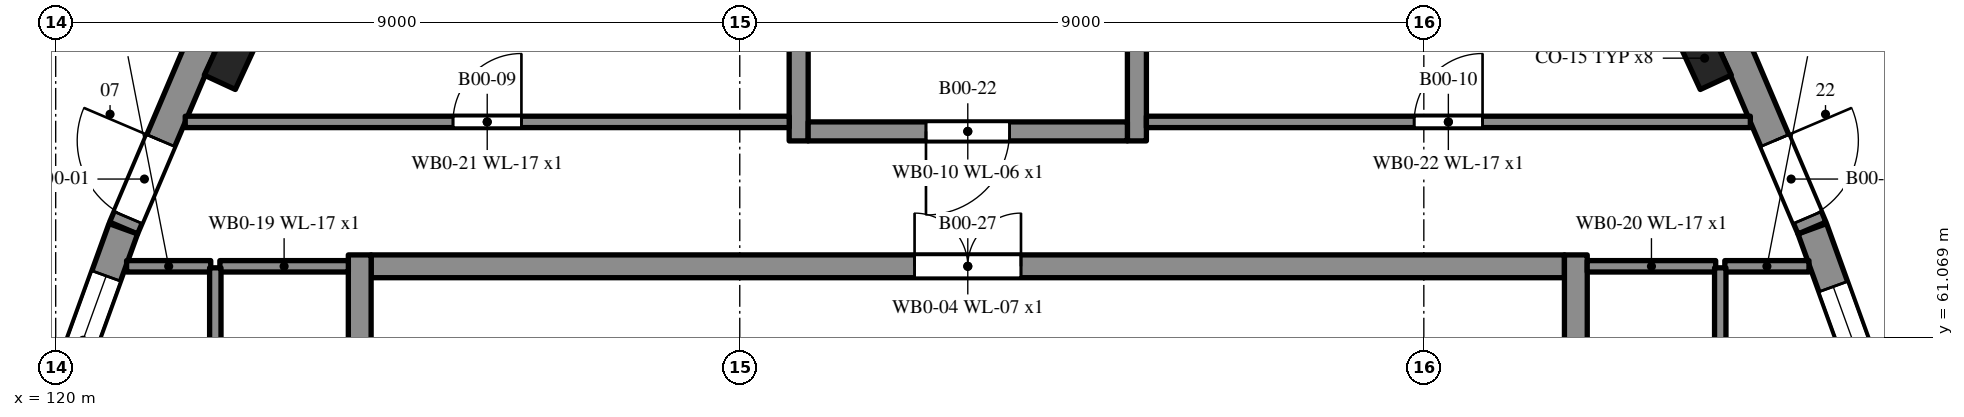
"""IFC4 building model, lengths in metres.
Left out: names, types, materials, properties, quantities, classifications, styles, units other than length and angle.
Written with IfcOpenShell. Run it as: python <this file> out.ifc"""

import sys

from ifc_helpers import new_model, si_unit, direction, frame, frame_2d, origin, origin_2d, place, context, subcontext, project, spatial, rectangle, extrude, element, fill, save


model = new_model("IFC4")
c1 = context("Model", 3, precision=1e-05, world=origin(), true_north=direction((0.0, 1.0)))
c2 = subcontext(c1, "Body", "Model", "MODEL_VIEW")
j1 = project(units=[si_unit("LENGTHUNIT", "METRE"), si_unit("PLANEANGLEUNIT", "RADIAN")], contexts=[c1])
p1 = place(None, origin())
s1 = spatial("IfcSite", under=j1, at=p1, CompositionType="ELEMENT")
p2 = place(p1, origin())
s2 = spatial("IfcBuilding", under=s1, at=p2, CompositionType="ELEMENT")
p3 = place(p2, origin())
s3 = spatial("IfcBuildingStorey", under=s2, at=p3, CompositionType="ELEMENT", Elevation=0.0)
p4 = place(p3, frame((144.001, 60.033, 0.0), z_axis=(0.0, 0.0, 1.0), x_axis=(-0.340394146267, 0.940282843184, 0.0)))
e1 = element("IfcWall", 1, at=p4, inside=s3, PredefinedType="SOLIDWALL", context=c2, shape_type="SweptSolid", body=[
    extrude(rectangle(XDim=2.616, YDim=0.4, at=frame_2d((1.308, 0.0))), origin(), (0.0, 0.0, 1.0), 5.1),
])
p5 = place(p4, frame((0.307, 0.0, 2.4)))
e2 = element("IfcOpeningElement", 2, at=p5, cuts=e1, PredefinedType="OPENING", context=c2, shape_type="SweptSolid", body=[
    extrude(rectangle(XDim=1.5, YDim=0.9, at=frame_2d((0.75, 0.45))), frame((0.0, 0.21, 0.0), z_axis=(0.0, -1.0, 0.0), x_axis=(1.0, 0.0, 0.0)), (0.0, 0.0, 1.0), 0.42),
])
p6 = place(p3, frame((143.107, 62.504, 0.0), z_axis=(0.0, 0.0, 1.0), x_axis=(-0.391529943778, 0.920165367271, 0.0)))
e3 = element("IfcWall", 3, at=p6, inside=s3, PredefinedType="SOLIDWALL", context=c2, shape_type="SweptSolid", body=[
    extrude(rectangle(XDim=2.616, YDim=0.4, at=frame_2d((1.308, 0.0))), origin(), (0.0, 0.0, 1.0), 5.1),
])
p7 = place(p6, frame((0.15, 0.0, 0.0)))
e4 = element("IfcOpeningElement", 4, at=p7, cuts=e3, PredefinedType="OPENING", context=c2, shape_type="SweptSolid", body=[
    extrude(rectangle(XDim=1.1, YDim=2.1, at=frame_2d((0.55, 1.05))), frame((0.0, 0.21, 0.0), z_axis=(0.0, -1.0, 0.0), x_axis=(1.0, 0.0, 0.0)), (0.0, 0.0, 1.0), 0.42),
])
p8 = place(p3, frame((121.917, 64.911, 0.0), z_axis=(0.0, 0.0, 1.0), x_axis=(-0.391529943778, -0.920165367271, 0.0)))
e5 = element("IfcWall", 5, at=p8, inside=s3, PredefinedType="SOLIDWALL", context=c2, shape_type="SweptSolid", body=[
    extrude(rectangle(XDim=2.616, YDim=0.4, at=frame_2d((1.308, 0.0))), origin(), (0.0, 0.0, 1.0), 5.1),
])
p9 = place(p8, frame((1.366, 0.0, 0.0)))
e6 = element("IfcOpeningElement", 6, at=p9, cuts=e5, PredefinedType="OPENING", context=c2, shape_type="SweptSolid", body=[
    extrude(rectangle(XDim=1.1, YDim=2.1, at=frame_2d((0.55, 1.05))), frame((0.0, 0.21, 0.0), z_axis=(0.0, -1.0, 0.0), x_axis=(1.0, 0.0, 0.0)), (0.0, 0.0, 1.0), 0.42),
])
p10 = place(p3, frame((120.889, 62.494, 0.0), z_axis=(0.0, 0.0, 1.0), x_axis=(-0.340394146267, -0.940282843184, 0.0)))
e7 = element("IfcWall", 7, at=p10, inside=s3, PredefinedType="SOLIDWALL", context=c2, shape_type="SweptSolid", body=[
    extrude(rectangle(XDim=2.616, YDim=0.4, at=frame_2d((1.308, 0.0))), origin(), (0.0, 0.0, 1.0), 5.1),
])
p11 = place(p10, frame((0.66, 0.0, 0.9)))
e8 = element("IfcOpeningElement", 8, at=p11, cuts=e7, PredefinedType="OPENING", context=c2, shape_type="SweptSolid", body=[
    extrude(rectangle(XDim=1.8, YDim=2.1, at=frame_2d((0.9, 1.05))), frame((0.0, 0.21, 0.0), z_axis=(0.0, -1.0, 0.0), x_axis=(1.0, 0.0, 0.0)), (0.0, 0.0, 1.0), 0.42),
])
for number, where, z_axis, x_axis in (
    (9, (141.694, 64.739, 0.0), (0.0, 0.0, 1.0), (-0.42, 0.908, 0.0)),
    (10, (122.306, 64.739, 0.0), (0.0, 0.0, 1.0), (-0.42, -0.908, 0.0)),
):
    element("IfcColumn", number, at=place(p3, frame(where, z_axis=z_axis, x_axis=x_axis)), inside=s3, PredefinedType="PILASTER", context=c2, shape_type="SweptSolid", body=[
        extrude(rectangle(XDim=0.7, YDim=0.45, at=origin_2d()), origin(), (0.0, 0.0, 1.0), 5.1),
    ])
p12 = place(p3, frame((124.15, 62.0, 0.0), z_axis=(0.0, 0.0, 1.0), x_axis=(1.0, 0.0, 0.0)))
e11 = element("IfcWall", 11, at=p12, inside=s3, PredefinedType="SHEAR", context=c2, shape_type="SweptSolid", body=[
    extrude(rectangle(XDim=15.7, YDim=0.3, at=frame_2d((7.85, 0.0))), origin(), (0.0, 0.0, 1.0), 5.1),
])
p13 = place(p12, frame((7.15, 0.0, 0.0)))
e12 = element("IfcOpeningElement", 12, at=p13, cuts=e11, PredefinedType="OPENING", context=c2, shape_type="SweptSolid", body=[
    extrude(rectangle(XDim=1.4, YDim=2.1, at=frame_2d((0.7, 1.05))), frame((0.0, 0.16, 0.0), z_axis=(0.0, -1.0, 0.0), x_axis=(1.0, 0.0, 0.0)), (0.0, 0.0, 1.0), 0.32),
])
p14 = place(p3, frame((140.0, 29.85, 0.0), z_axis=(0.0, 0.0, 1.0), x_axis=(0.0, 1.0, 0.0)))
e13 = element("IfcWall", 13, at=p14, inside=s3, PredefinedType="SHEAR", context=c2, shape_type="SweptSolid", body=[
    extrude(rectangle(XDim=32.3, YDim=0.3, at=frame_2d((16.15, 0.0))), origin(), (0.0, 0.0, 1.0), 5.1),
])
p15 = place(p14, frame((6.406, 0.0, 0.0)))
e14 = element("IfcOpeningElement", 14, at=p15, cuts=e13, PredefinedType="OPENING", context=c2, shape_type="SweptSolid", body=[
    extrude(rectangle(XDim=1.4, YDim=2.1, at=frame_2d((0.7, 1.05))), frame((0.0, 0.16, 0.0), z_axis=(0.0, -1.0, 0.0), x_axis=(1.0, 0.0, 0.0)), (0.0, 0.0, 1.0), 0.32),
])
p16 = place(p14, frame((24.494, 0.0, 0.0)))
e15 = element("IfcOpeningElement", 15, at=p16, cuts=e13, PredefinedType="OPENING", context=c2, shape_type="SweptSolid", body=[
    extrude(rectangle(XDim=1.4, YDim=2.1, at=frame_2d((0.7, 1.05))), frame((0.0, 0.16, 0.0), z_axis=(0.0, -1.0, 0.0), x_axis=(1.0, 0.0, 0.0)), (0.0, 0.0, 1.0), 0.32),
])
p17 = place(p3, frame((124.0, 62.15, 0.0), z_axis=(0.0, 0.0, 1.0), x_axis=(0.0, -1.0, 0.0)))
e16 = element("IfcWall", 16, at=p17, inside=s3, PredefinedType="SHEAR", context=c2, shape_type="SweptSolid", body=[
    extrude(rectangle(XDim=32.3, YDim=0.3, at=frame_2d((16.15, 0.0))), origin(), (0.0, 0.0, 1.0), 5.1),
])
p18 = place(p17, frame((6.406, 0.0, 0.0)))
e17 = element("IfcOpeningElement", 17, at=p18, cuts=e16, PredefinedType="OPENING", context=c2, shape_type="SweptSolid", body=[
    extrude(rectangle(XDim=1.4, YDim=2.1, at=frame_2d((0.7, 1.05))), frame((0.0, 0.16, 0.0), z_axis=(0.0, -1.0, 0.0), x_axis=(1.0, 0.0, 0.0)), (0.0, 0.0, 1.0), 0.32),
])
p19 = place(p17, frame((24.494, 0.0, 0.0)))
e18 = element("IfcOpeningElement", 18, at=p19, cuts=e16, PredefinedType="OPENING", context=c2, shape_type="SweptSolid", body=[
    extrude(rectangle(XDim=1.4, YDim=2.1, at=frame_2d((0.7, 1.05))), frame((0.0, 0.16, 0.0), z_axis=(0.0, -1.0, 0.0), x_axis=(1.0, 0.0, 0.0)), (0.0, 0.0, 1.0), 0.32),
])
for number, where, z_axis, x_axis in (
    (19, (134.225, 63.65, 0.0), (0.0, 0.0, 1.0), (0.0, 1.0, 0.0)),
    (20, (129.775, 72.2, 0.0), (0.0, 0.0, 1.0), (0.0, -1.0, 0.0)),
):
    element("IfcWall", number, at=place(p3, frame(where, z_axis=z_axis, x_axis=x_axis)), inside=s3, PredefinedType="SHEAR", context=c2, shape_type="SweptSolid", body=[
        extrude(rectangle(XDim=8.55, YDim=0.25, at=frame_2d((4.275, 0.0))), origin(), (0.0, 0.0, 1.0), 5.4),
    ])
p20 = place(p3, frame((134.1, 63.775, 0.0), z_axis=(0.0, 0.0, 1.0), x_axis=(-1.0, 0.0, 0.0)))
e21 = element("IfcWall", 21, at=p20, inside=s3, PredefinedType="SHEAR", context=c2, shape_type="SweptSolid", body=[
    extrude(rectangle(XDim=4.2, YDim=0.25, at=frame_2d((2.1, 0.0))), origin(), (0.0, 0.0, 1.0), 5.4),
])
p21 = place(p20, frame((1.55, 0.0, 0.0)))
e22 = element("IfcOpeningElement", 22, at=p21, cuts=e21, PredefinedType="OPENING", context=c2, shape_type="SweptSolid", body=[
    extrude(rectangle(XDim=1.1, YDim=2.1, at=frame_2d((0.55, 1.05))), frame((0.0, 0.135, 0.0), z_axis=(0.0, -1.0, 0.0), x_axis=(1.0, 0.0, 0.0)), (0.0, 0.0, 1.0), 0.27),
])
for number, where, z_axis, x_axis in (
    (23, (123.851, 62.0, 0.0), (0.0, 0.0, 1.0), (-1.0, 0.0, 0.0)),
    (24, (141.84, 62.0, 0.0), (0.0, 0.0, 1.0), (-1.0, 0.0, 0.0)),
):
    element("IfcWall", number, at=place(p3, frame(where, z_axis=z_axis, x_axis=x_axis)), inside=s3, PredefinedType="PARTITIONING", context=c2, shape_type="SweptSolid", body=[
        extrude(rectangle(XDim=1.691, YDim=0.15, at=frame_2d((0.845, 0.0))), origin(), (0.0, 0.0, 1.0), 5.1),
    ])
p22 = place(p3, frame((121.704, 63.9, 0.0), z_axis=(0.0, 0.0, 1.0), x_axis=(1.0, 0.0, 0.0)))
e25 = element("IfcWall", 25, at=p22, inside=s3, PredefinedType="PARTITIONING", context=c2, shape_type="SweptSolid", body=[
    extrude(rectangle(XDim=7.946, YDim=0.15, at=frame_2d((3.973, 0.0))), origin(), (0.0, 0.0, 1.0), 5.1),
])
p23 = place(p22, frame((3.523, 0.0, 0.0)))
e26 = element("IfcOpeningElement", 26, at=p23, cuts=e25, PredefinedType="OPENING", context=c2, shape_type="SweptSolid", body=[
    extrude(rectangle(XDim=0.9, YDim=2.1, at=frame_2d((0.45, 1.05))), frame((0.0, 0.085, 0.0), z_axis=(0.0, -1.0, 0.0), x_axis=(1.0, 0.0, 0.0)), (0.0, 0.0, 1.0), 0.17),
])
p24 = place(p3, frame((134.35, 63.9, 0.0), z_axis=(0.0, 0.0, 1.0), x_axis=(1.0, 0.0, 0.0)))
e27 = element("IfcWall", 27, at=p24, inside=s3, PredefinedType="PARTITIONING", context=c2, shape_type="SweptSolid", body=[
    extrude(rectangle(XDim=7.946, YDim=0.15, at=frame_2d((3.973, 0.0))), origin(), (0.0, 0.0, 1.0), 5.1),
])
p25 = place(p24, frame((3.523, 0.0, 0.0)))
e28 = element("IfcOpeningElement", 28, at=p25, cuts=e27, PredefinedType="OPENING", context=c2, shape_type="SweptSolid", body=[
    extrude(rectangle(XDim=0.9, YDim=2.1, at=frame_2d((0.45, 1.05))), frame((0.0, 0.085, 0.0), z_axis=(0.0, -1.0, 0.0), x_axis=(1.0, 0.0, 0.0)), (0.0, 0.0, 1.0), 0.17),
])
for number, where, z_axis, x_axis in (
    (29, (122.04, 62.0, 0.0), (0.0, 0.0, 1.0), (-1.0, 0.0, 0.0)),
    (30, (143.067, 62.0, 0.0), (0.0, 0.0, 1.0), (-1.0, 0.0, 0.0)),
):
    element("IfcWall", number, at=place(p3, frame(where, z_axis=z_axis, x_axis=x_axis)), inside=s3, PredefinedType="PARTITIONING", context=c2, shape_type="SweptSolid", body=[
        extrude(rectangle(XDim=1.107, YDim=0.15, at=frame_2d((0.554, 0.0))), origin(), (0.0, 0.0, 1.0), 5.1),
    ])
p26 = place(p3, frame((122.1, 55.52, 0.0), z_axis=(0.0, 0.0, 1.0), x_axis=(0.0, 1.0, 0.0)))
e31 = element("IfcWall", 31, at=p26, inside=s3, PredefinedType="PARTITIONING", context=c2, shape_type="SweptSolid", body=[
    extrude(rectangle(XDim=6.46, YDim=0.15, at=frame_2d((3.23, 0.0))), origin(), (0.0, 0.0, 1.0), 5.1),
])
p27 = place(p26, frame((2.78, 0.0, 0.0)))
e32 = element("IfcOpeningElement", 32, at=p27, cuts=e31, PredefinedType="OPENING", context=c2, shape_type="SweptSolid", body=[
    extrude(rectangle(XDim=0.9, YDim=2.1, at=frame_2d((0.45, 1.05))), frame((0.0, 0.085, 0.0), z_axis=(0.0, -1.0, 0.0), x_axis=(1.0, 0.0, 0.0)), (0.0, 0.0, 1.0), 0.17),
])
p28 = place(p3, frame((141.9, 61.98, 0.0), z_axis=(0.0, 0.0, 1.0), x_axis=(0.0, -1.0, 0.0)))
e33 = element("IfcWall", 33, at=p28, inside=s3, PredefinedType="PARTITIONING", context=c2, shape_type="SweptSolid", body=[
    extrude(rectangle(XDim=5.96, YDim=0.15, at=frame_2d((2.98, 0.0))), origin(), (0.0, 0.0, 1.0), 5.1),
])
p29 = place(p28, frame((2.53, 0.0, 0.0)))
e34 = element("IfcOpeningElement", 34, at=p29, cuts=e33, PredefinedType="OPENING", context=c2, shape_type="SweptSolid", body=[
    extrude(rectangle(XDim=0.9, YDim=2.1, at=frame_2d((0.45, 1.05))), frame((0.0, 0.085, 0.0), z_axis=(0.0, -1.0, 0.0), x_axis=(1.0, 0.0, 0.0)), (0.0, 0.0, 1.0), 0.17),
])
p30 = place(p9, frame((1.1, 0.0, 0.0), z_axis=(0.0, 0.0, 1.0), x_axis=(-1.0, 0.0, 0.0)))
e35 = element("IfcDoor", 35, at=p30, inside=s3, OperationType="SINGLE_SWING_RIGHT", PredefinedType="DOOR", context=c2, shape_type="SweptSolid", body=[
    extrude(rectangle(XDim=1.1, YDim=2.1, at=frame_2d((0.55, 1.05))), frame((0.0, 0.025, 0.0), z_axis=(0.0, -1.0, 0.0), x_axis=(1.0, 0.0, 0.0)), (0.0, 0.0, 1.0), 0.05),
])
fill(e6, e35)
p31 = place(p7, frame((1.1, 0.0, 0.0), z_axis=(0.0, 0.0, 1.0), x_axis=(-1.0, 0.0, 0.0)))
e36 = element("IfcDoor", 36, at=p31, inside=s3, OperationType="SINGLE_SWING_LEFT", PredefinedType="DOOR", context=c2, shape_type="SweptSolid", body=[
    extrude(rectangle(XDim=1.1, YDim=2.1, at=frame_2d((0.55, 1.05))), frame((0.0, 0.025, 0.0), z_axis=(0.0, -1.0, 0.0), x_axis=(1.0, 0.0, 0.0)), (0.0, 0.0, 1.0), 0.05),
])
fill(e4, e36)
p32 = place(p5, origin())
e37 = element("IfcWindow", 37, at=p32, inside=s3, PartitioningType="SINGLE_PANEL", PredefinedType="WINDOW", context=c2, shape_type="SweptSolid", body=[
    extrude(rectangle(XDim=1.5, YDim=0.9, at=frame_2d((0.75, 0.45))), frame((0.0, 0.03, 0.0), z_axis=(0.0, -1.0, 0.0), x_axis=(1.0, 0.0, 0.0)), (0.0, 0.0, 1.0), 0.06),
])
fill(e2, e37)
p33 = place(p11, origin())
e38 = element("IfcWindow", 38, at=p33, inside=s3, PartitioningType="SINGLE_PANEL", PredefinedType="WINDOW", context=c2, shape_type="SweptSolid", body=[
    extrude(rectangle(XDim=1.8, YDim=2.1, at=frame_2d((0.9, 1.05))), frame((0.0, 0.03, 0.0), z_axis=(0.0, -1.0, 0.0), x_axis=(1.0, 0.0, 0.0)), (0.0, 0.0, 1.0), 0.06),
])
fill(e8, e38)
p34 = place(p23, origin())
e39 = element("IfcDoor", 39, at=p34, inside=s3, OperationType="SINGLE_SWING_RIGHT", PredefinedType="DOOR", context=c2, shape_type="SweptSolid", body=[
    extrude(rectangle(XDim=0.9, YDim=2.1, at=frame_2d((0.45, 1.05))), frame((0.0, 0.025, 0.0), z_axis=(0.0, -1.0, 0.0), x_axis=(1.0, 0.0, 0.0)), (0.0, 0.0, 1.0), 0.05),
])
fill(e26, e39)
p35 = place(p25, origin())
e40 = element("IfcDoor", 40, at=p35, inside=s3, OperationType="SINGLE_SWING_RIGHT", PredefinedType="DOOR", context=c2, shape_type="SweptSolid", body=[
    extrude(rectangle(XDim=0.9, YDim=2.1, at=frame_2d((0.45, 1.05))), frame((0.0, 0.025, 0.0), z_axis=(0.0, -1.0, 0.0), x_axis=(1.0, 0.0, 0.0)), (0.0, 0.0, 1.0), 0.05),
])
fill(e28, e40)
p36 = place(p21, origin())
e41 = element("IfcDoor", 41, at=p36, inside=s3, OperationType="SINGLE_SWING_RIGHT", PredefinedType="DOOR", context=c2, shape_type="SweptSolid", body=[
    extrude(rectangle(XDim=1.1, YDim=2.1, at=frame_2d((0.55, 1.05))), frame((0.0, 0.025, 0.0), z_axis=(0.0, -1.0, 0.0), x_axis=(1.0, 0.0, 0.0)), (0.0, 0.0, 1.0), 0.05),
])
fill(e22, e41)
p37 = place(p13, origin())
e42 = element("IfcDoor", 42, at=p37, inside=s3, OperationType="DOUBLE_DOOR_SINGLE_SWING", PredefinedType="DOOR", context=c2, shape_type="SweptSolid", body=[
    extrude(rectangle(XDim=1.4, YDim=2.1, at=frame_2d((0.7, 1.05))), frame((0.0, 0.025, 0.0), z_axis=(0.0, -1.0, 0.0), x_axis=(1.0, 0.0, 0.0)), (0.0, 0.0, 1.0), 0.05),
])
fill(e12, e42)
save(model, sys.argv[1])
